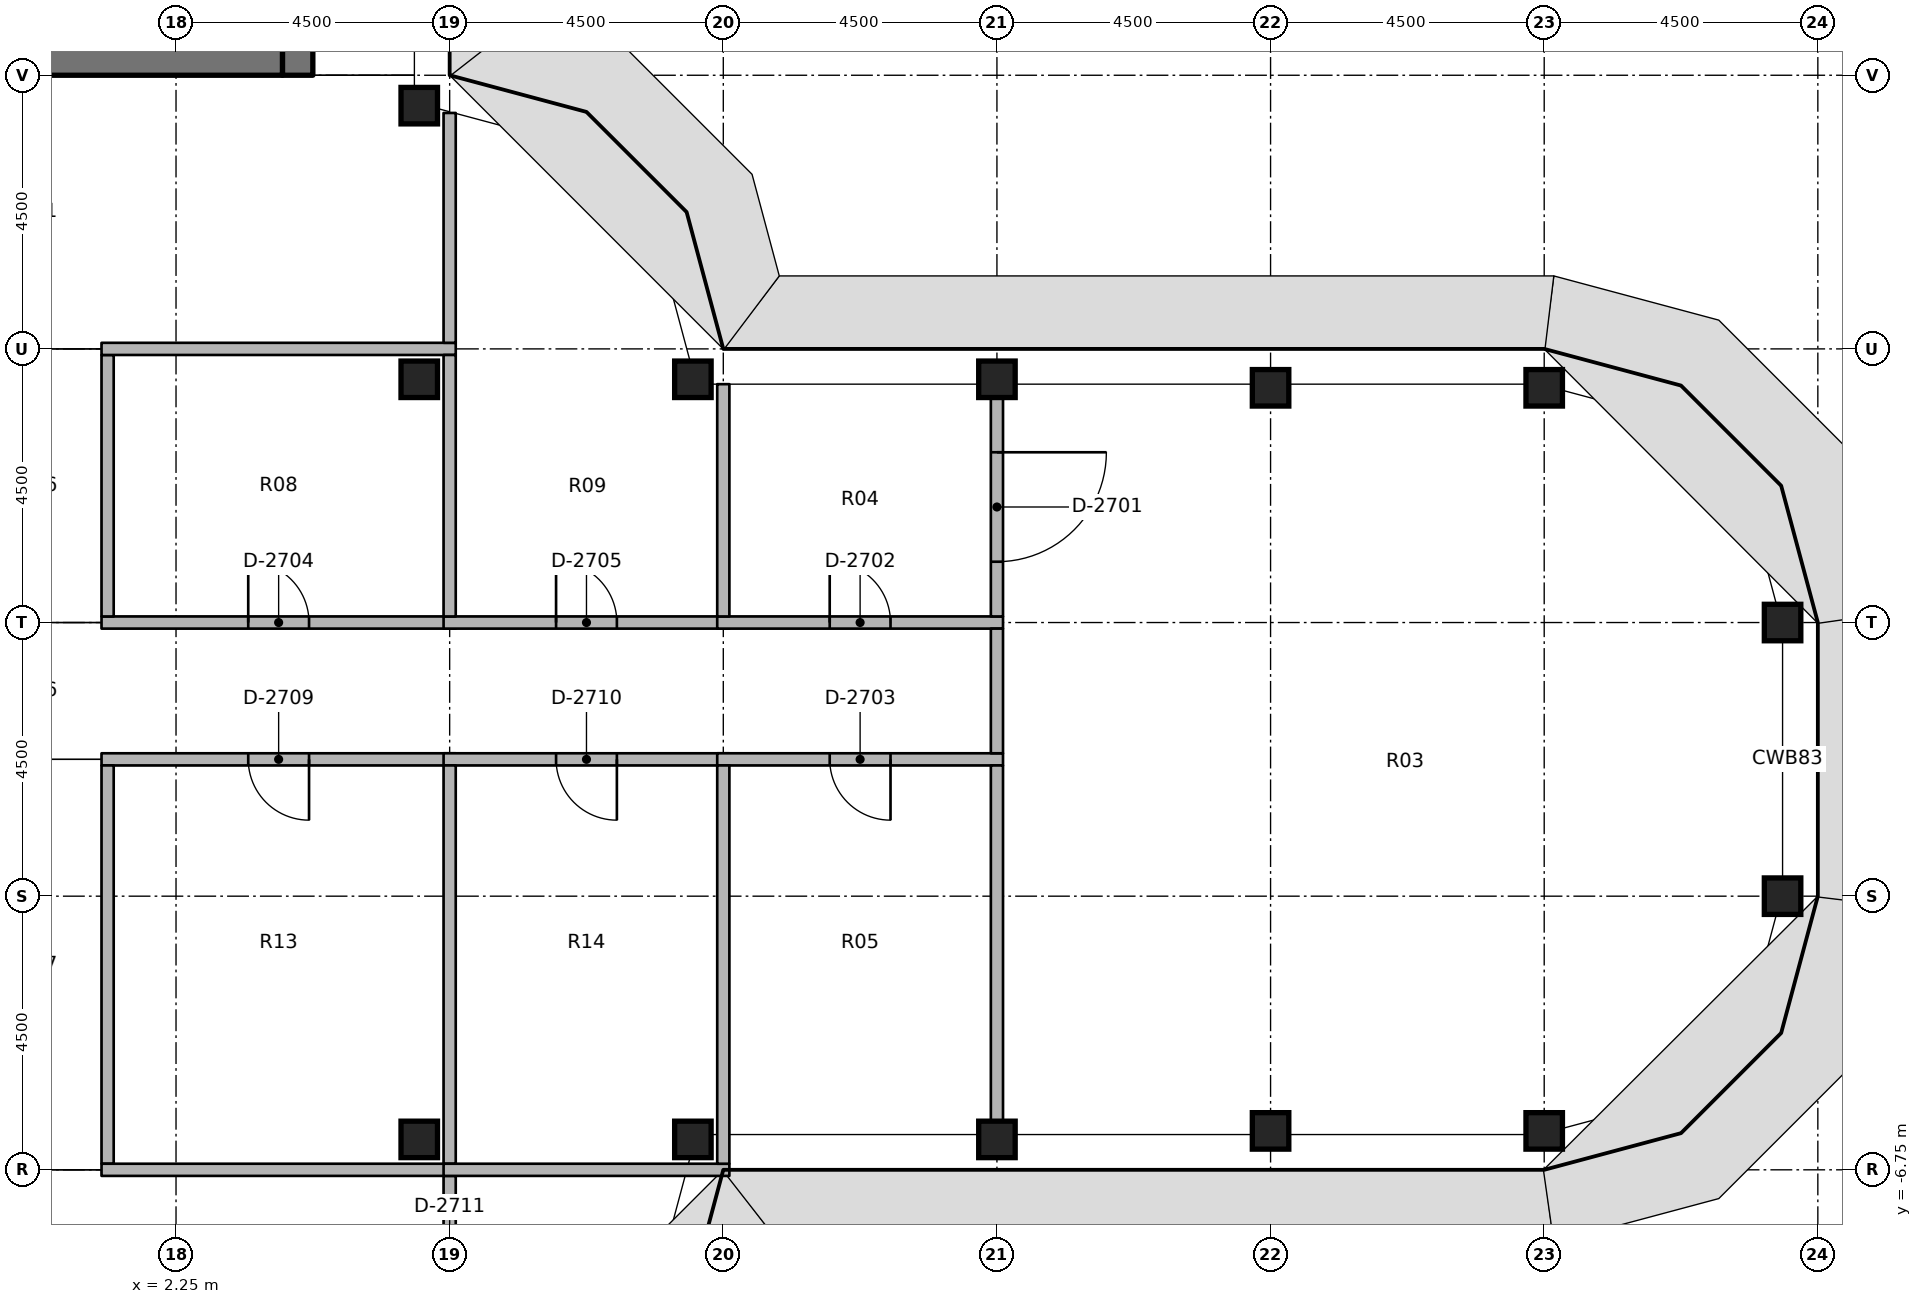
"""IFC4 building model, lengths in metres.
Left out: names, types, materials, properties, quantities, classifications, styles, units other than length and angle.
Written with IfcOpenShell. Run it as: python <this file> out.ifc"""

import sys

from ifc_helpers import new_model, si_unit, direction, frame, frame_2d, origin, origin_2d, place, context, subcontext, project, spatial, rectangle, extrude, element, fill, save


model = new_model("IFC4")
c1 = context("Model", 3, precision=1e-05, world=origin(), true_north=direction((0.0, 1.0)))
c2 = subcontext(c1, "Body", "Model", "MODEL_VIEW")
j1 = project(units=[si_unit("LENGTHUNIT", "METRE"), si_unit("PLANEANGLEUNIT", "RADIAN")], contexts=[c1])
p1 = place(None, origin())
s1 = spatial("IfcSite", under=j1, at=p1, CompositionType="ELEMENT")
p2 = place(p1, origin())
s2 = spatial("IfcBuilding", under=s1, at=p2, CompositionType="ELEMENT")
p3 = place(p2, frame((0.0, 0.0, 253.6)))
s3 = spatial("IfcBuildingStorey", under=s2, at=p3, CompositionType="ELEMENT", Elevation=253.6)
for number, where, z_axis, x_axis in (
    (1, (6.25, -6.25, 0.0), (0.0, 0.0, 1.0), (1.0, 0.0, 0.0)),
    (2, (6.25, 6.25, 0.0), (0.0, 0.0, 1.0), (1.0, 0.0, 0.0)),
    (3, (6.25, 10.75, 0.0), (0.0, 0.0, 1.0), (1.0, 0.0, 0.0)),
    (4, (10.75, -6.25, 0.0), (0.0, 0.0, 1.0), (1.0, 0.0, 0.0)),
    (5, (10.75, 6.25, 0.0), (0.0, 0.0, 1.0), (1.0, 0.0, 0.0)),
    (6, (15.75, -6.25, 0.0), (0.0, 0.0, 1.0), (1.0, 0.0, 0.0)),
    (7, (15.75, 6.25, 0.0), (0.0, 0.0, 1.0), (1.0, 0.0, 0.0)),
    (8, (20.25, -6.11, 0.0), (0.0, 0.0, 1.0), (1.0, 0.0, 0.0)),
    (9, (20.25, 6.11, 0.0), (0.0, 0.0, 1.0), (1.0, 0.0, 0.0)),
    (10, (24.75, -6.11, 0.0), (0.0, 0.0, 1.0), (1.0, 0.0, 0.0)),
    (11, (24.75, 6.11, 0.0), (0.0, 0.0, 1.0), (1.0, 0.0, 0.0)),
    (12, (28.67, -2.25, 0.0), (0.0, 0.0, 1.0), (1.0, 0.0, 0.0)),
    (13, (28.67, 2.25, 0.0), (0.0, 0.0, 1.0), (1.0, 0.0, 0.0)),
):
    element("IfcColumn", number, at=place(p3, frame(where, z_axis=z_axis, x_axis=x_axis)), inside=s3, PredefinedType="COLUMN", context=c2, shape_type="SweptSolid", body=[
        extrude(rectangle(XDim=0.6, YDim=0.6, at=origin_2d()), origin(), (0.0, 0.0, 1.0), 3.65),
    ])
p4 = place(p3, frame((4.25, 11.25, 0.0), z_axis=(0.0, 0.0, 1.0), x_axis=(0.0, 1.0, 0.0)))
e14 = element("IfcWall", 14, at=p4, inside=s3, PredefinedType="SHEAR", context=c2, shape_type="SweptSolid", body=[
    extrude(rectangle(XDim=15.0, YDim=0.5, at=frame_2d((7.5, 0.0))), origin(), (0.0, 0.0, 1.0), 3.8),
])
p5 = place(p4, frame((7.15, 0.0, 0.0)))
e15 = element("IfcOpeningElement", 15, at=p5, cuts=e14, PredefinedType="OPENING", context=c2, shape_type="SweptSolid", body=[
    extrude(rectangle(XDim=1.5, YDim=2.3, at=frame_2d((0.75, 1.15))), frame((0.0, 0.26, 0.0), z_axis=(0.0, -1.0, 0.0), x_axis=(1.0, 0.0, 0.0)), (0.0, 0.0, 1.0), 0.52),
])
p6 = place(p4, frame((5.55, 0.0, 0.0)))
e16 = element("IfcOpeningElement", 16, at=p6, cuts=e14, PredefinedType="OPENING", context=c2, shape_type="SweptSolid", body=[
    extrude(rectangle(XDim=1.2, YDim=2.1, at=frame_2d((0.6, 1.05))), frame((0.0, 0.26, 0.0), z_axis=(0.0, -1.0, 0.0), x_axis=(1.0, 0.0, 0.0)), (0.0, 0.0, 1.0), 0.52),
])
p7 = place(p3, frame((-4.0, 11.5, 0.0), z_axis=(0.0, 0.0, 1.0), x_axis=(1.0, 0.0, 0.0)))
e17 = element("IfcWall", 17, at=p7, inside=s3, PredefinedType="SHEAR", context=c2, shape_type="SweptSolid", body=[
    extrude(rectangle(XDim=8.0, YDim=0.5, at=frame_2d((4.0, 0.0))), origin(), (0.0, 0.0, 1.0), 3.8),
])
p8 = place(p3, frame((1.025, 2.25, 0.0), z_axis=(0.0, 0.0, 1.0), x_axis=(1.0, 0.0, 0.0)))
e18 = element("IfcWall", 18, at=p8, inside=s3, PredefinedType="PARTITIONING", context=c2, shape_type="SweptSolid", body=[
    extrude(rectangle(XDim=5.825, YDim=0.2, at=frame_2d((2.913, 0.0))), origin(), (0.0, 0.0, 1.0), 2.75),
])
p9 = place(p8, frame((2.413, 0.0, 0.0)))
e19 = element("IfcOpeningElement", 19, at=p9, cuts=e18, PredefinedType="OPENING", context=c2, shape_type="SweptSolid", body=[
    extrude(rectangle(XDim=1.0, YDim=2.1, at=frame_2d((0.5, 1.05))), frame((0.0, 0.11, 0.0), z_axis=(0.0, -1.0, 0.0), x_axis=(1.0, 0.0, 0.0)), (0.0, 0.0, 1.0), 0.22),
])
p10 = place(p3, frame((6.65, 2.25, 0.0), z_axis=(0.0, 0.0, 1.0), x_axis=(1.0, 0.0, 0.0)))
e20 = element("IfcWall", 20, at=p10, inside=s3, PredefinedType="PARTITIONING", context=c2, shape_type="SweptSolid", body=[
    extrude(rectangle(XDim=4.7, YDim=0.2, at=frame_2d((2.35, 0.0))), origin(), (0.0, 0.0, 1.0), 2.75),
])
p11 = place(p10, frame((1.85, 0.0, 0.0)))
e21 = element("IfcOpeningElement", 21, at=p11, cuts=e20, PredefinedType="OPENING", context=c2, shape_type="SweptSolid", body=[
    extrude(rectangle(XDim=1.0, YDim=2.1, at=frame_2d((0.5, 1.05))), frame((0.0, 0.11, 0.0), z_axis=(0.0, -1.0, 0.0), x_axis=(1.0, 0.0, 0.0)), (0.0, 0.0, 1.0), 0.22),
])
p12 = place(p3, frame((6.85, 0.0, 0.0), z_axis=(0.0, 0.0, 1.0), x_axis=(-1.0, 0.0, 0.0)))
e22 = element("IfcWall", 22, at=p12, inside=s3, PredefinedType="PARTITIONING", context=c2, shape_type="SweptSolid", body=[
    extrude(rectangle(XDim=5.825, YDim=0.2, at=frame_2d((2.913, 0.0))), origin(), (0.0, 0.0, 1.0), 2.75),
])
p13 = place(p12, frame((2.413, 0.0, 0.0)))
e23 = element("IfcOpeningElement", 23, at=p13, cuts=e22, PredefinedType="OPENING", context=c2, shape_type="SweptSolid", body=[
    extrude(rectangle(XDim=1.0, YDim=2.1, at=frame_2d((0.5, 1.05))), frame((0.0, 0.11, 0.0), z_axis=(0.0, -1.0, 0.0), x_axis=(1.0, 0.0, 0.0)), (0.0, 0.0, 1.0), 0.22),
])
p14 = place(p3, frame((11.35, 0.0, 0.0), z_axis=(0.0, 0.0, 1.0), x_axis=(-1.0, 0.0, 0.0)))
e24 = element("IfcWall", 24, at=p14, inside=s3, PredefinedType="PARTITIONING", context=c2, shape_type="SweptSolid", body=[
    extrude(rectangle(XDim=4.7, YDim=0.2, at=frame_2d((2.35, 0.0))), origin(), (0.0, 0.0, 1.0), 2.75),
])
p15 = place(p14, frame((1.85, 0.0, 0.0)))
e25 = element("IfcOpeningElement", 25, at=p15, cuts=e24, PredefinedType="OPENING", context=c2, shape_type="SweptSolid", body=[
    extrude(rectangle(XDim=1.0, YDim=2.1, at=frame_2d((0.5, 1.05))), frame((0.0, 0.11, 0.0), z_axis=(0.0, -1.0, 0.0), x_axis=(1.0, 0.0, 0.0)), (0.0, 0.0, 1.0), 0.22),
])
p16 = place(p3, frame((11.15, 2.25, 0.0), z_axis=(0.0, 0.0, 1.0), x_axis=(1.0, 0.0, 0.0)))
e26 = element("IfcWall", 26, at=p16, inside=s3, PredefinedType="PARTITIONING", context=c2, shape_type="SweptSolid", body=[
    extrude(rectangle(XDim=4.7, YDim=0.2, at=frame_2d((2.35, 0.0))), origin(), (0.0, 0.0, 1.0), 2.75),
])
p17 = place(p16, frame((1.85, 0.0, 0.0)))
e27 = element("IfcOpeningElement", 27, at=p17, cuts=e26, PredefinedType="OPENING", context=c2, shape_type="SweptSolid", body=[
    extrude(rectangle(XDim=1.0, YDim=2.1, at=frame_2d((0.5, 1.05))), frame((0.0, 0.11, 0.0), z_axis=(0.0, -1.0, 0.0), x_axis=(1.0, 0.0, 0.0)), (0.0, 0.0, 1.0), 0.22),
])
p18 = place(p3, frame((15.85, 0.0, 0.0), z_axis=(0.0, 0.0, 1.0), x_axis=(-1.0, 0.0, 0.0)))
e28 = element("IfcWall", 28, at=p18, inside=s3, PredefinedType="PARTITIONING", context=c2, shape_type="SweptSolid", body=[
    extrude(rectangle(XDim=4.7, YDim=0.2, at=frame_2d((2.35, 0.0))), origin(), (0.0, 0.0, 1.0), 2.75),
])
p19 = place(p18, frame((1.85, 0.0, 0.0)))
e29 = element("IfcOpeningElement", 29, at=p19, cuts=e28, PredefinedType="OPENING", context=c2, shape_type="SweptSolid", body=[
    extrude(rectangle(XDim=1.0, YDim=2.1, at=frame_2d((0.5, 1.05))), frame((0.0, 0.11, 0.0), z_axis=(0.0, -1.0, 0.0), x_axis=(1.0, 0.0, 0.0)), (0.0, 0.0, 1.0), 0.22),
])
p20 = place(p3, frame((15.75, 0.1, 0.0), z_axis=(0.0, 0.0, 1.0), x_axis=(0.0, 1.0, 0.0)))
e30 = element("IfcWall", 30, at=p20, inside=s3, PredefinedType="PARTITIONING", context=c2, shape_type="SweptSolid", body=[
    extrude(rectangle(XDim=2.05, YDim=0.2, at=frame_2d((1.025, 0.0))), origin(), (0.0, 0.0, 1.0), 2.75),
])
p21 = place(p3, frame((1.125, 2.35, 0.0), z_axis=(0.0, 0.0, 1.0), x_axis=(0.0, 1.0, 0.0)))
e31 = element("IfcWall", 31, at=p21, inside=s3, PredefinedType="PARTITIONING", context=c2, shape_type="SweptSolid", body=[
    extrude(rectangle(XDim=4.3, YDim=0.2, at=frame_2d((2.15, 0.0))), origin(), (0.0, 0.0, 1.0), 2.75),
])
p22 = place(p3, frame((1.125, -6.65, 0.0), z_axis=(0.0, 0.0, 1.0), x_axis=(0.0, 1.0, 0.0)))
e32 = element("IfcWall", 32, at=p22, inside=s3, PredefinedType="PARTITIONING", context=c2, shape_type="SweptSolid", body=[
    extrude(rectangle(XDim=6.55, YDim=0.2, at=frame_2d((3.275, 0.0))), origin(), (0.0, 0.0, 1.0), 2.75),
])
p23 = place(p3, frame((1.025, 6.75, 0.0), z_axis=(0.0, 0.0, 1.0), x_axis=(1.0, 0.0, 0.0)))
e33 = element("IfcWall", 33, at=p23, inside=s3, PredefinedType="PARTITIONING", context=c2, shape_type="SweptSolid", body=[
    extrude(rectangle(XDim=5.825, YDim=0.2, at=frame_2d((2.913, 0.0))), origin(), (0.0, 0.0, 1.0), 2.75),
])
p24 = place(p3, frame((6.75, 6.85, 0.0), z_axis=(0.0, 0.0, 1.0), x_axis=(0.0, 1.0, 0.0)))
e34 = element("IfcWall", 34, at=p24, inside=s3, PredefinedType="PARTITIONING", context=c2, shape_type="SweptSolid", body=[
    extrude(rectangle(XDim=3.78, YDim=0.2, at=frame_2d((1.89, 0.0))), origin(), (0.0, 0.0, 1.0), 2.75),
])
p25 = place(p3, frame((1.025, -6.75, 0.0), z_axis=(0.0, 0.0, 1.0), x_axis=(1.0, 0.0, 0.0)))
e35 = element("IfcWall", 35, at=p25, inside=s3, PredefinedType="PARTITIONING", context=c2, shape_type="SweptSolid", body=[
    extrude(rectangle(XDim=5.825, YDim=0.2, at=frame_2d((2.913, 0.0))), origin(), (0.0, 0.0, 1.0), 2.75),
])
p26 = place(p3, frame((6.75, -6.85, 0.0), z_axis=(0.0, 0.0, 1.0), x_axis=(0.0, -1.0, 0.0)))
e36 = element("IfcWall", 36, at=p26, inside=s3, PredefinedType="PARTITIONING", context=c2, shape_type="SweptSolid", body=[
    extrude(rectangle(XDim=3.78, YDim=0.2, at=frame_2d((1.89, 0.0))), origin(), (0.0, 0.0, 1.0), 2.75),
])
p27 = place(p26, frame((1.44, 0.0, 0.0)))
e37 = element("IfcOpeningElement", 37, at=p27, cuts=e36, PredefinedType="OPENING", context=c2, shape_type="SweptSolid", body=[
    extrude(rectangle(XDim=0.9, YDim=2.1, at=frame_2d((0.45, 1.05))), frame((0.0, 0.11, 0.0), z_axis=(0.0, -1.0, 0.0), x_axis=(1.0, 0.0, 0.0)), (0.0, 0.0, 1.0), 0.22),
])
p28 = place(p3, frame((6.75, 2.35, 0.0), z_axis=(0.0, 0.0, 1.0), x_axis=(0.0, 1.0, 0.0)))
e38 = element("IfcWall", 38, at=p28, inside=s3, PredefinedType="PARTITIONING", context=c2, shape_type="SweptSolid", body=[
    extrude(rectangle(XDim=4.3, YDim=0.2, at=frame_2d((2.15, 0.0))), origin(), (0.0, 0.0, 1.0), 2.75),
])
p29 = place(p3, frame((11.25, 2.35, 0.0), z_axis=(0.0, 0.0, 1.0), x_axis=(0.0, 1.0, 0.0)))
e39 = element("IfcWall", 39, at=p29, inside=s3, PredefinedType="PARTITIONING", context=c2, shape_type="SweptSolid", body=[
    extrude(rectangle(XDim=3.82, YDim=0.2, at=frame_2d((1.91, 0.0))), origin(), (0.0, 0.0, 1.0), 2.75),
])
p30 = place(p3, frame((6.75, -6.65, 0.0), z_axis=(0.0, 0.0, 1.0), x_axis=(0.0, 1.0, 0.0)))
e40 = element("IfcWall", 40, at=p30, inside=s3, PredefinedType="PARTITIONING", context=c2, shape_type="SweptSolid", body=[
    extrude(rectangle(XDim=6.55, YDim=0.2, at=frame_2d((3.275, 0.0))), origin(), (0.0, 0.0, 1.0), 2.75),
])
p31 = place(p3, frame((6.65, -6.75, 0.0), z_axis=(0.0, 0.0, 1.0), x_axis=(1.0, 0.0, 0.0)))
e41 = element("IfcWall", 41, at=p31, inside=s3, PredefinedType="PARTITIONING", context=c2, shape_type="SweptSolid", body=[
    extrude(rectangle(XDim=4.7, YDim=0.2, at=frame_2d((2.35, 0.0))), origin(), (0.0, 0.0, 1.0), 2.75),
])
p32 = place(p3, frame((11.25, -6.65, 0.0), z_axis=(0.0, 0.0, 1.0), x_axis=(0.0, 1.0, 0.0)))
e42 = element("IfcWall", 42, at=p32, inside=s3, PredefinedType="PARTITIONING", context=c2, shape_type="SweptSolid", body=[
    extrude(rectangle(XDim=6.55, YDim=0.2, at=frame_2d((3.275, 0.0))), origin(), (0.0, 0.0, 1.0), 2.75),
])
p33 = place(p3, frame((15.75, 5.95, 0.0), z_axis=(0.0, 0.0, 1.0), x_axis=(0.0, -1.0, 0.0)))
e43 = element("IfcWall", 43, at=p33, inside=s3, PredefinedType="PARTITIONING", context=c2, shape_type="SweptSolid", body=[
    extrude(rectangle(XDim=3.6, YDim=0.2, at=frame_2d((1.8, 0.0))), origin(), (0.0, 0.0, 1.0), 2.75),
])
p34 = place(p33, frame((0.9, 0.0, 0.0)))
e44 = element("IfcOpeningElement", 44, at=p34, cuts=e43, PredefinedType="OPENING", context=c2, shape_type="SweptSolid", body=[
    extrude(rectangle(XDim=1.8, YDim=2.1, at=frame_2d((0.9, 1.05))), frame((0.0, 0.11, 0.0), z_axis=(0.0, -1.0, 0.0), x_axis=(1.0, 0.0, 0.0)), (0.0, 0.0, 1.0), 0.22),
])
p35 = place(p3, frame((15.75, -5.95, 0.0), z_axis=(0.0, 0.0, 1.0), x_axis=(0.0, 1.0, 0.0)))
e45 = element("IfcWall", 45, at=p35, inside=s3, PredefinedType="PARTITIONING", context=c2, shape_type="SweptSolid", body=[
    extrude(rectangle(XDim=5.85, YDim=0.2, at=frame_2d((2.925, 0.0))), origin(), (0.0, 0.0, 1.0), 2.75),
])
p36 = place(p34, origin())
e46 = element("IfcDoor", 46, at=p36, inside=s3, OperationType="DOUBLE_DOOR_SINGLE_SWING", PredefinedType="DOOR", context=c2, shape_type="SweptSolid", body=[
    extrude(rectangle(XDim=1.8, YDim=2.1, at=frame_2d((0.9, 1.05))), frame((0.0, 0.025, 0.0), z_axis=(0.0, -1.0, 0.0), x_axis=(1.0, 0.0, 0.0)), (0.0, 0.0, 1.0), 0.05),
])
fill(e44, e46)
p37 = place(p17, origin())
e47 = element("IfcDoor", 47, at=p37, inside=s3, OperationType="SINGLE_SWING_RIGHT", PredefinedType="DOOR", context=c2, shape_type="SweptSolid", body=[
    extrude(rectangle(XDim=1.0, YDim=2.1, at=frame_2d((0.5, 1.05))), frame((0.0, 0.025, 0.0), z_axis=(0.0, -1.0, 0.0), x_axis=(1.0, 0.0, 0.0)), (0.0, 0.0, 1.0), 0.05),
])
fill(e27, e47)
p38 = place(p19, origin())
e48 = element("IfcDoor", 48, at=p38, inside=s3, OperationType="SINGLE_SWING_RIGHT", PredefinedType="DOOR", context=c2, shape_type="SweptSolid", body=[
    extrude(rectangle(XDim=1.0, YDim=2.1, at=frame_2d((0.5, 1.05))), frame((0.0, 0.025, 0.0), z_axis=(0.0, -1.0, 0.0), x_axis=(1.0, 0.0, 0.0)), (0.0, 0.0, 1.0), 0.05),
])
fill(e29, e48)
p39 = place(p9, origin())
e49 = element("IfcDoor", 49, at=p39, inside=s3, OperationType="SINGLE_SWING_RIGHT", PredefinedType="DOOR", context=c2, shape_type="SweptSolid", body=[
    extrude(rectangle(XDim=1.0, YDim=2.1, at=frame_2d((0.5, 1.05))), frame((0.0, 0.025, 0.0), z_axis=(0.0, -1.0, 0.0), x_axis=(1.0, 0.0, 0.0)), (0.0, 0.0, 1.0), 0.05),
])
fill(e19, e49)
p40 = place(p11, origin())
e50 = element("IfcDoor", 50, at=p40, inside=s3, OperationType="SINGLE_SWING_RIGHT", PredefinedType="DOOR", context=c2, shape_type="SweptSolid", body=[
    extrude(rectangle(XDim=1.0, YDim=2.1, at=frame_2d((0.5, 1.05))), frame((0.0, 0.025, 0.0), z_axis=(0.0, -1.0, 0.0), x_axis=(1.0, 0.0, 0.0)), (0.0, 0.0, 1.0), 0.05),
])
fill(e21, e50)
p41 = place(p13, origin())
e51 = element("IfcDoor", 51, at=p41, inside=s3, OperationType="SINGLE_SWING_RIGHT", PredefinedType="DOOR", context=c2, shape_type="SweptSolid", body=[
    extrude(rectangle(XDim=1.0, YDim=2.1, at=frame_2d((0.5, 1.05))), frame((0.0, 0.025, 0.0), z_axis=(0.0, -1.0, 0.0), x_axis=(1.0, 0.0, 0.0)), (0.0, 0.0, 1.0), 0.05),
])
fill(e23, e51)
p42 = place(p15, origin())
e52 = element("IfcDoor", 52, at=p42, inside=s3, OperationType="SINGLE_SWING_RIGHT", PredefinedType="DOOR", context=c2, shape_type="SweptSolid", body=[
    extrude(rectangle(XDim=1.0, YDim=2.1, at=frame_2d((0.5, 1.05))), frame((0.0, 0.025, 0.0), z_axis=(0.0, -1.0, 0.0), x_axis=(1.0, 0.0, 0.0)), (0.0, 0.0, 1.0), 0.05),
])
fill(e25, e52)
save(model, sys.argv[1])
